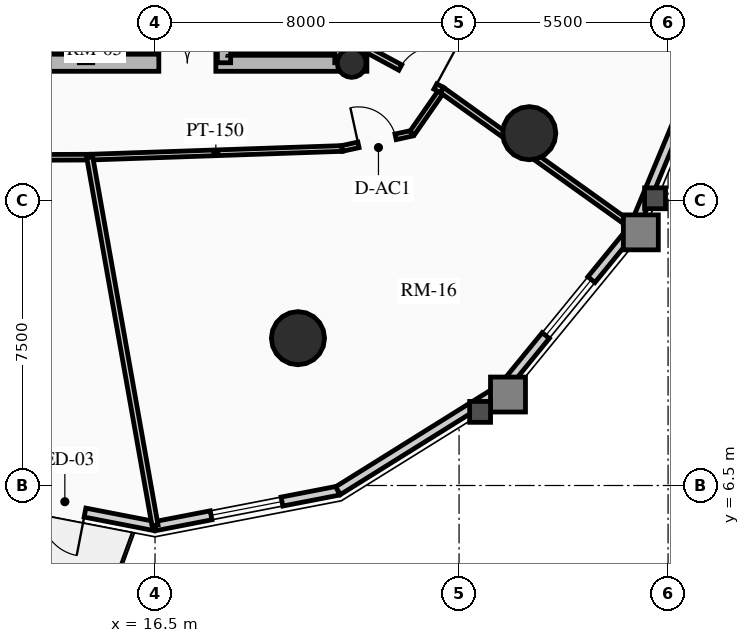
"""IFC4 building model, lengths in metres.
Left out: names, types, materials, properties, quantities, classifications, styles, units other than length and angle.
Written with IfcOpenShell. Run it as: python <this file> out.ifc"""

import sys

from ifc_helpers import new_model, si_unit, direction, frame, frame_2d, origin, origin_2d, place, context, subcontext, project, spatial, rectangle, circle, hollow_circle, extrude, source, transform, mapped, element, fill, save


model = new_model("IFC4")
c1 = context("Model", 3, precision=1e-05, world=origin(), true_north=direction((0.0, 1.0)))
c2 = subcontext(c1, "Body", "Model", "MODEL_VIEW")
j1 = project(units=[si_unit("LENGTHUNIT", "METRE"), si_unit("PLANEANGLEUNIT", "RADIAN")], contexts=[c1])
p1 = place(None, origin())
s1 = spatial("IfcSite", under=j1, at=p1, CompositionType="ELEMENT")
p2 = place(p1, origin())
s2 = spatial("IfcBuilding", under=s1, at=p2, CompositionType="ELEMENT")
p3 = place(p2, frame((0.0, 0.0, 119.62)))
s3 = spatial("IfcBuildingStorey", under=s2, at=p3, CompositionType="ELEMENT", Elevation=119.62)
p4 = place(p3, frame((21.85, 17.4, 0.0), z_axis=(0.0, 0.0, 1.0), x_axis=(0.0, 1.0, 0.0)))
e1 = element("IfcWall", 1, at=p4, inside=s3, PredefinedType="SHEAR", context=c2, shape_type="SweptSolid", body=[
    extrude(rectangle(XDim=14.2, YDim=0.45, at=frame_2d((7.1, 0.0))), origin(), (0.0, 0.0, 1.0), 2.91),
])
p5 = place(p3, frame((11.15, 17.625, 0.0), z_axis=(0.0, 0.0, 1.0), x_axis=(1.0, 0.0, 0.0)))
e2 = element("IfcWall", 2, at=p5, inside=s3, PredefinedType="SHEAR", context=c2, shape_type="SweptSolid", body=[
    extrude(rectangle(XDim=10.7, YDim=0.45, at=frame_2d((5.35, 0.0))), origin(), (0.0, 0.0, 1.0), 2.91),
])
m1 = source(origin(), c2, "Body", "SweptSolid", [
    extrude(rectangle(XDim=1.5, YDim=2.02, at=frame_2d((0.75, 1.01))), frame((0.0, 0.235, 0.0), z_axis=(0.0, -1.0, 0.0), x_axis=(1.0, 0.0, 0.0)), (0.0, 0.0, 1.0), 0.47),
])
p6 = place(p5, frame((5.45, 0.0, 0.0)))
e3 = element("IfcOpeningElement", 3, at=p6, cuts=e2, PredefinedType="OPENING", context=c2, shape_type="MappedRepresentation", body=[
    mapped(m1, transform((0.0, 0.0, 0.0), x_axis=(1.0, 0.0, 0.0), y_axis=(0.0, 1.0, 0.0), z_axis=(0.0, 0.0, 1.0), scale=1.0)),
])
p7 = place(p3, frame((14.685, 17.625, 0.0), z_axis=(0.0, 0.0, 1.0), x_axis=(0.0, 1.0, 0.0)))
e4 = element("IfcWall", 4, at=p7, inside=s3, PredefinedType="SHEAR", context=c2, shape_type="SweptSolid", body=[
    extrude(rectangle(XDim=13.75, YDim=0.35, at=frame_2d((6.875, 0.0))), origin(), (0.0, 0.0, 1.0), 2.91),
])
m2 = source(origin(), c2, "Body", "SweptSolid", [
    extrude(rectangle(XDim=1.1, YDim=2.015, at=frame_2d((0.55, 1.007))), frame((0.0, 0.185, 0.0), z_axis=(0.0, -1.0, 0.0), x_axis=(1.0, 0.0, 0.0)), (0.0, 0.0, 1.0), 0.37),
])
p8 = place(p7, frame((4.875, 0.0, 0.0)))
e5 = element("IfcOpeningElement", 5, at=p8, cuts=e4, PredefinedType="OPENING", context=c2, shape_type="MappedRepresentation", body=[
    mapped(m2, transform((0.0, 0.0, 0.0), x_axis=(1.0, 0.0, 0.0), y_axis=(0.0, 1.0, 0.0), z_axis=(0.0, 0.0, 1.0), scale=1.0)),
])
m3 = source(origin(), c2, "Body", "SweptSolid", [
    extrude(rectangle(XDim=1.15, YDim=2.02, at=frame_2d((0.575, 1.01))), frame((0.0, 0.185, 0.0), z_axis=(0.0, -1.0, 0.0), x_axis=(1.0, 0.0, 0.0)), (0.0, 0.0, 1.0), 0.37),
])
p9 = place(p7, frame((7.295, 0.0, 0.0)))
e6 = element("IfcOpeningElement", 6, at=p9, cuts=e4, PredefinedType="OPENING", context=c2, shape_type="MappedRepresentation", body=[
    mapped(m3, transform((0.0, 0.0, 0.0), x_axis=(1.0, 0.0, 0.0), y_axis=(0.0, 1.0, 0.0), z_axis=(0.0, 0.0, 1.0), scale=1.0)),
])
p10 = place(p3, frame((18.315, 17.625, 0.0), z_axis=(0.0, 0.0, 1.0), x_axis=(0.0, 1.0, 0.0)))
e7 = element("IfcWall", 7, at=p10, inside=s3, PredefinedType="SHEAR", context=c2, shape_type="SweptSolid", body=[
    extrude(rectangle(XDim=13.75, YDim=0.35, at=frame_2d((6.875, 0.0))), origin(), (0.0, 0.0, 1.0), 2.91),
])
p11 = place(p10, frame((10.0, 0.0, 0.0)))
e8 = element("IfcOpeningElement", 8, at=p11, cuts=e7, PredefinedType="OPENING", context=c2, shape_type="MappedRepresentation", body=[
    mapped(m2, transform((0.0, 0.0, 0.0), x_axis=(1.0, 0.0, 0.0), y_axis=(0.0, 1.0, 0.0), z_axis=(0.0, 0.0, 1.0), scale=1.0)),
])
p12 = place(p10, frame((12.0, 0.0, 0.0)))
e9 = element("IfcOpeningElement", 9, at=p12, cuts=e7, PredefinedType="OPENING", context=c2, shape_type="MappedRepresentation", body=[
    mapped(m2, transform((0.0, 0.0, 0.0), x_axis=(1.0, 0.0, 0.0), y_axis=(0.0, 1.0, 0.0), z_axis=(0.0, 0.0, 1.0), scale=1.0)),
])
p13 = place(p10, frame((5.305, 0.0, 0.0)))
e10 = element("IfcOpeningElement", 10, at=p13, cuts=e7, PredefinedType="OPENING", context=c2, shape_type="MappedRepresentation", body=[
    mapped(m3, transform((0.0, 0.0, 0.0), x_axis=(1.0, 0.0, 0.0), y_axis=(0.0, 1.0, 0.0), z_axis=(0.0, 0.0, 1.0), scale=1.0)),
])
p14 = place(p3, frame((21.405, 17.625, 0.0), z_axis=(0.0, 0.0, 1.0), x_axis=(0.0, 1.0, 0.0)))
e11 = element("IfcWall", 11, at=p14, inside=s3, PredefinedType="SHEAR", context=c2, shape_type="SweptSolid", body=[
    extrude(rectangle(XDim=6.72, YDim=0.35, at=frame_2d((3.36, 0.0))), origin(), (0.0, 0.0, 1.0), 2.91),
])
p15 = place(p3, frame((21.675, 17.62, 0.0), z_axis=(0.0, 0.0, 1.0), x_axis=(1.0, 0.0, 0.0)))
e12 = element("IfcColumn", 12, at=p15, inside=s3, PredefinedType="COLUMN", context=c2, shape_type="SweptSolid", body=[
    extrude(hollow_circle(Radius=0.38, WallThickness=0.032, at=origin_2d()), origin(), (0.0, 0.0, 1.0), 2.91),
])
for number, where, z_axis, x_axis in (
    (13, (20.261, 10.377, 0.0), (0.0, 0.0, 1.0), (1.0, 0.0, 0.0)),
    (14, (26.347, 15.771, 0.0), (0.0, 0.0, 1.0), (1.0, 0.0, 0.0)),
):
    element("IfcColumn", number, at=place(p3, frame(where, z_axis=z_axis, x_axis=x_axis)), inside=s3, PredefinedType="USERDEFINED", context=c2, shape_type="SweptSolid", body=[
        extrude(circle(Radius=0.7, at=origin_2d()), origin(), (0.0, 0.0, 1.0), 2.91),
    ])
p16 = place(p3, frame((16.5, 5.43, 0.0), z_axis=(0.0, 0.0, 1.0), x_axis=(-0.981723785992, 0.190311344954, 0.0)))
e15 = element("IfcWall", 15, at=p16, inside=s3, PredefinedType="SOLIDWALL", context=c2, shape_type="SweptSolid", body=[
    extrude(rectangle(XDim=4.904, YDim=0.24, at=frame_2d((2.452, 0.0))), origin(), (0.0, 0.0, 1.0), 2.179),
])
m4 = source(origin(), c2, "Body", "SweptSolid", [
    extrude(rectangle(XDim=1.15, YDim=2.005, at=frame_2d((0.575, 1.002))), frame((0.0, 0.13, 0.0), z_axis=(0.0, -1.0, 0.0), x_axis=(1.0, 0.0, 0.0)), (0.0, 0.0, 1.0), 0.26),
])
p17 = place(p16, frame((1.877, 0.0, 0.0)))
e16 = element("IfcOpeningElement", 16, at=p17, cuts=e15, PredefinedType="OPENING", context=c2, shape_type="MappedRepresentation", body=[
    mapped(m4, transform((0.0, 0.0, 0.0), x_axis=(1.0, 0.0, 0.0), y_axis=(0.0, 1.0, 0.0), z_axis=(0.0, 0.0, 1.0), scale=1.0)),
])
p18 = place(p3, frame((21.315, 6.363, 0.0), z_axis=(0.0, 0.0, 1.0), x_axis=(-0.981723785992, -0.190311344954, 0.0)))
e17 = element("IfcWall", 17, at=p18, inside=s3, PredefinedType="SOLIDWALL", context=c2, shape_type="SweptSolid", body=[
    extrude(rectangle(XDim=4.904, YDim=0.24, at=frame_2d((2.452, 0.0))), origin(), (0.0, 0.0, 1.0), 2.179),
])
m5 = source(origin(), c2, "Body", "SweptSolid", [
    extrude(rectangle(XDim=1.9, YDim=1.35, at=frame_2d((0.95, 0.675))), frame((0.0, 0.13, 0.0), z_axis=(0.0, -1.0, 0.0), x_axis=(1.0, 0.0, 0.0)), (0.0, 0.0, 1.0), 0.26),
])
p19 = place(p18, frame((1.502, 0.0, 0.65)))
e18 = element("IfcOpeningElement", 18, at=p19, cuts=e17, PredefinedType="OPENING", context=c2, shape_type="MappedRepresentation", body=[
    mapped(m5, transform((0.0, 0.0, 0.0), x_axis=(1.0, 0.0, 0.0), y_axis=(0.0, 1.0, 0.0), z_axis=(0.0, 0.0, 1.0), scale=1.0)),
])
p20 = place(p3, frame((25.658, 9.072, 0.0), z_axis=(0.0, 0.0, 1.0), x_axis=(-0.848520380187, -0.529162701263, 0.0)))
e19 = element("IfcWall", 19, at=p20, inside=s3, PredefinedType="SOLIDWALL", context=c2, shape_type="SweptSolid", body=[
    extrude(rectangle(XDim=5.119, YDim=0.24, at=frame_2d((2.56, 0.0))), origin(), (0.0, 0.0, 1.0), 2.179),
])
p21 = place(p3, frame((29.105, 13.291, 0.0), z_axis=(0.0, 0.0, 1.0), x_axis=(-0.632700781152, -0.77439635945, 0.0)))
e20 = element("IfcWall", 20, at=p21, inside=s3, PredefinedType="SOLIDWALL", context=c2, shape_type="SweptSolid", body=[
    extrude(rectangle(XDim=5.448, YDim=0.24, at=frame_2d((2.724, 0.0))), origin(), (0.0, 0.0, 1.0), 2.179),
])
p22 = place(p21, frame((1.774, 0.0, 0.65)))
e21 = element("IfcOpeningElement", 21, at=p22, cuts=e20, PredefinedType="OPENING", context=c2, shape_type="MappedRepresentation", body=[
    mapped(m5, transform((0.0, 0.0, 0.0), x_axis=(1.0, 0.0, 0.0), y_axis=(0.0, 1.0, 0.0), z_axis=(0.0, 0.0, 1.0), scale=1.0)),
])
p23 = place(p3, frame((31.318, 18.607, 0.0), z_axis=(0.0, 0.0, 1.0), x_axis=(-0.384344417632, -0.923189779317, 0.0)))
e22 = element("IfcWall", 22, at=p23, inside=s3, PredefinedType="SOLIDWALL", context=c2, shape_type="SweptSolid", body=[
    extrude(rectangle(XDim=5.758, YDim=0.24, at=frame_2d((2.879, 0.0))), origin(), (0.0, 0.0, 1.0), 2.179),
])
p24 = place(p3, frame((11.46, 15.129, 0.0), z_axis=(0.0, 0.0, 1.0), x_axis=(0.999993513287, 0.003601858435, 0.0)))
e23 = element("IfcWall", 23, at=p24, inside=s3, PredefinedType="PARTITIONING", context=c2, shape_type="SweptSolid", body=[
    extrude(rectangle(XDim=3.321, YDim=0.15, at=frame_2d((1.661, 0.0))), origin(), (0.0, 0.0, 1.0), 2.225),
])
p25 = place(p3, frame((14.781, 15.141, 0.0), z_axis=(0.0, 0.0, 1.0), x_axis=(0.999407918707, 0.034406569513, 0.0)))
e24 = element("IfcWall", 24, at=p25, inside=s3, PredefinedType="PARTITIONING", context=c2, shape_type="SweptSolid", body=[
    extrude(rectangle(XDim=6.642, YDim=0.15, at=frame_2d((3.321, 0.0))), origin(), (0.0, 0.0, 1.0), 2.225),
])
p26 = place(p3, frame((21.419, 15.369, 0.0), z_axis=(0.0, 0.0, 1.0), x_axis=(0.977192701953, 0.212354475464, 0.0)))
e25 = element("IfcWall", 25, at=p26, inside=s3, PredefinedType="PARTITIONING", context=c2, shape_type="SweptSolid", body=[
    extrude(rectangle(XDim=1.888, YDim=0.15, at=frame_2d((0.944, 0.0))), origin(), (0.0, 0.0, 1.0), 2.225),
])
m6 = source(origin(), c2, "Body", "SweptSolid", [
    extrude(rectangle(XDim=1.0, YDim=2.015, at=frame_2d((0.5, 1.007))), frame((0.0, 0.085, 0.0), z_axis=(0.0, -1.0, 0.0), x_axis=(1.0, 0.0, 0.0)), (0.0, 0.0, 1.0), 0.17),
])
p27 = place(p26, frame((0.444, 0.0, 0.0)))
e26 = element("IfcOpeningElement", 26, at=p27, cuts=e25, PredefinedType="OPENING", context=c2, shape_type="MappedRepresentation", body=[
    mapped(m6, transform((0.0, 0.0, 0.0), x_axis=(1.0, 0.0, 0.0), y_axis=(0.0, 1.0, 0.0), z_axis=(0.0, 0.0, 1.0), scale=1.0)),
])
p28 = place(p3, frame((23.263, 15.77, 0.0), z_axis=(0.0, 0.0, 1.0), x_axis=(0.570743456919, 0.821128434768, 0.0)))
e27 = element("IfcWall", 27, at=p28, inside=s3, PredefinedType="PARTITIONING", context=c2, shape_type="SweptSolid", body=[
    extrude(rectangle(XDim=1.382, YDim=0.15, at=frame_2d((0.691, 0.0))), origin(), (0.0, 0.0, 1.0), 2.225),
])
p29 = place(p3, frame((14.781, 15.141, 0.0), z_axis=(0.0, 0.0, 1.0), x_axis=(0.174659805548, -0.984628839881, 0.0)))
e28 = element("IfcWall", 28, at=p29, inside=s3, PredefinedType="PARTITIONING", context=c2, shape_type="SweptSolid", body=[
    extrude(rectangle(XDim=9.842, YDim=0.16, at=frame_2d((4.921, 0.0))), origin(), (0.0, 0.0, 1.0), 2.179),
])
p30 = place(p3, frame((24.052, 16.905, 0.0), z_axis=(0.0, 0.0, 1.0), x_axis=(0.813437670746, -0.581652091727, 0.0)))
e29 = element("IfcWall", 29, at=p30, inside=s3, PredefinedType="PARTITIONING", context=c2, shape_type="SweptSolid", body=[
    extrude(rectangle(XDim=6.192, YDim=0.16, at=frame_2d((3.096, 0.0))), origin(), (0.0, 0.0, 1.0), 2.179),
])
p31 = place(p3, frame((22.075, 17.975, 0.0), z_axis=(0.0, 0.0, 1.0), x_axis=(0.879356383302, -0.476164206073, 0.0)))
e30 = element("IfcWall", 30, at=p31, inside=s3, PredefinedType="PARTITIONING", context=c2, shape_type="SweptSolid", body=[
    extrude(rectangle(XDim=2.248, YDim=0.16, at=frame_2d((1.124, 0.0))), origin(), (0.0, 0.0, 1.0), 2.225),
])
m7 = source(origin(), c2, "Body", "SweptSolid", [
    extrude(rectangle(XDim=1.05, YDim=2.015, at=frame_2d((0.525, 1.007))), frame((0.0, 0.09, 0.0), z_axis=(0.0, -1.0, 0.0), x_axis=(1.0, 0.0, 0.0)), (0.0, 0.0, 1.0), 0.18),
])
p32 = place(p31, frame((0.998, 0.0, 0.0)))
e31 = element("IfcOpeningElement", 31, at=p32, cuts=e30, PredefinedType="OPENING", context=c2, shape_type="MappedRepresentation", body=[
    mapped(m7, transform((0.0, 0.0, 0.0), x_axis=(1.0, 0.0, 0.0), y_axis=(0.0, 1.0, 0.0), z_axis=(0.0, 0.0, 1.0), scale=1.0)),
])
m8 = source(origin(), c2, "Body", "SweptSolid", [
    extrude(rectangle(XDim=1.15, YDim=2.005, at=frame_2d((0.575, 1.002))), frame((0.0, 0.025, 0.0), z_axis=(0.0, -1.0, 0.0), x_axis=(1.0, 0.0, 0.0)), (0.0, 0.0, 1.0), 0.05),
])
p33 = place(p17, origin())
e32 = element("IfcDoor", 32, at=p33, inside=s3, OperationType="SINGLE_SWING_LEFT", PredefinedType="DOOR", context=c2, shape_type="MappedRepresentation", body=[
    mapped(m8, transform((0.0, 0.0, 0.0), x_axis=(1.0, 0.0, 0.0), y_axis=(0.0, 1.0, 0.0), z_axis=(0.0, 0.0, 1.0), scale=1.0)),
])
fill(e16, e32)
m9 = source(origin(), c2, "Body", "SweptSolid", [
    extrude(rectangle(XDim=1.9, YDim=1.35, at=frame_2d((0.95, 0.675))), frame((0.0, 0.03, 0.0), z_axis=(0.0, -1.0, 0.0), x_axis=(1.0, 0.0, 0.0)), (0.0, 0.0, 1.0), 0.06),
])
p34 = place(p19, origin())
e33 = element("IfcWindow", 33, at=p34, inside=s3, PartitioningType="DOUBLE_PANEL_VERTICAL", PredefinedType="WINDOW", context=c2, shape_type="MappedRepresentation", body=[
    mapped(m9, transform((0.0, 0.0, 0.0), x_axis=(1.0, 0.0, 0.0), y_axis=(0.0, 1.0, 0.0), z_axis=(0.0, 0.0, 1.0), scale=1.0)),
])
fill(e18, e33)
p35 = place(p22, origin())
e34 = element("IfcWindow", 34, at=p35, inside=s3, PartitioningType="DOUBLE_PANEL_VERTICAL", PredefinedType="WINDOW", context=c2, shape_type="MappedRepresentation", body=[
    mapped(m9, transform((0.0, 0.0, 0.0), x_axis=(1.0, 0.0, 0.0), y_axis=(0.0, 1.0, 0.0), z_axis=(0.0, 0.0, 1.0), scale=1.0)),
])
fill(e21, e34)
m10 = source(origin(), c2, "Body", "SweptSolid", [
    extrude(rectangle(XDim=1.5, YDim=2.02, at=frame_2d((0.75, 1.01))), frame((0.0, 0.025, 0.0), z_axis=(0.0, -1.0, 0.0), x_axis=(1.0, 0.0, 0.0)), (0.0, 0.0, 1.0), 0.05),
])
p36 = place(p6, origin())
e35 = element("IfcDoor", 35, at=p36, inside=s3, OperationType="DOUBLE_DOOR_SINGLE_SWING", PredefinedType="DOOR", context=c2, shape_type="MappedRepresentation", body=[
    mapped(m10, transform((0.0, 0.0, 0.0), x_axis=(1.0, 0.0, 0.0), y_axis=(0.0, 1.0, 0.0), z_axis=(0.0, 0.0, 1.0), scale=1.0)),
])
fill(e3, e35)
m11 = source(origin(), c2, "Body", "SweptSolid", [
    extrude(rectangle(XDim=1.05, YDim=2.015, at=frame_2d((0.525, 1.007))), frame((0.0, 0.025, 0.0), z_axis=(0.0, -1.0, 0.0), x_axis=(1.0, 0.0, 0.0)), (0.0, 0.0, 1.0), 0.05),
])
p37 = place(p32, origin())
e36 = element("IfcDoor", 36, at=p37, inside=s3, OperationType="SINGLE_SWING_RIGHT", PredefinedType="DOOR", context=c2, shape_type="MappedRepresentation", body=[
    mapped(m11, transform((0.0, 0.0, 0.0), x_axis=(1.0, 0.0, 0.0), y_axis=(0.0, 1.0, 0.0), z_axis=(0.0, 0.0, 1.0), scale=1.0)),
])
fill(e31, e36)
m12 = source(origin(), c2, "Body", "SweptSolid", [
    extrude(rectangle(XDim=1.0, YDim=2.015, at=frame_2d((0.5, 1.007))), frame((0.0, 0.025, 0.0), z_axis=(0.0, -1.0, 0.0), x_axis=(1.0, 0.0, 0.0)), (0.0, 0.0, 1.0), 0.05),
])
p38 = place(p27, origin())
e37 = element("IfcDoor", 37, at=p38, inside=s3, OperationType="SINGLE_SWING_LEFT", PredefinedType="DOOR", context=c2, shape_type="MappedRepresentation", body=[
    mapped(m12, transform((0.0, 0.0, 0.0), x_axis=(1.0, 0.0, 0.0), y_axis=(0.0, 1.0, 0.0), z_axis=(0.0, 0.0, 1.0), scale=1.0)),
])
fill(e26, e37)
save(model, sys.argv[1])
